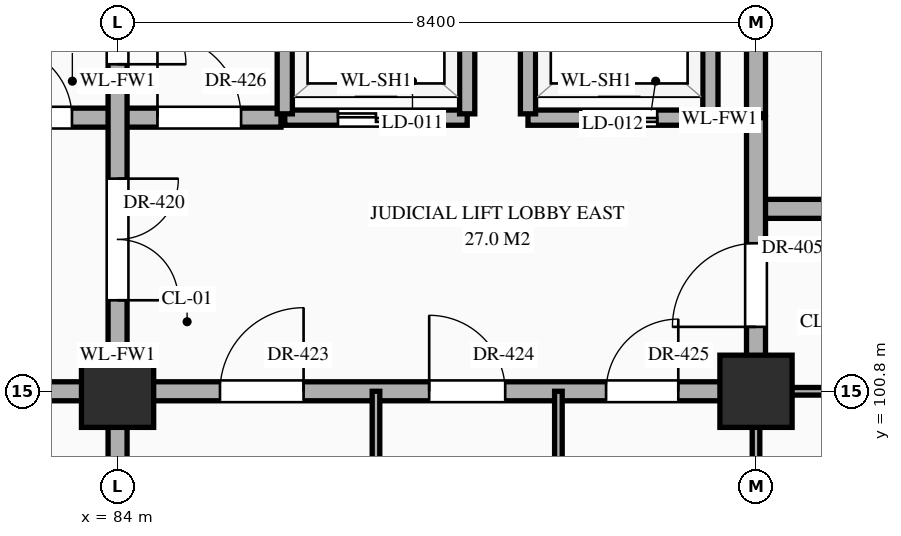
"""IFC4 building model, lengths in metres.
Left out: names, types, materials, properties, quantities, classifications, styles, units other than length and angle.
Written with IfcOpenShell. Run it as: python <this file> out.ifc"""

import sys

from ifc_helpers import new_model, si_unit, direction, frame, frame_2d, origin, origin_2d, place, context, subcontext, project, spatial, rectangle, extrude, element, fill, save


model = new_model("IFC4")
c1 = context("Model", 3, precision=1e-05, world=origin(), true_north=direction((0.0, 1.0)))
c2 = subcontext(c1, "Body", "Model", "MODEL_VIEW")
j1 = project(units=[si_unit("LENGTHUNIT", "METRE"), si_unit("PLANEANGLEUNIT", "RADIAN")], contexts=[c1])
p1 = place(None, origin())
s1 = spatial("IfcSite", under=j1, at=p1, CompositionType="ELEMENT")
p2 = place(p1, origin())
s2 = spatial("IfcBuilding", under=s1, at=p2, CompositionType="ELEMENT")
p3 = place(p2, frame((0.0, 0.0, -5.4)))
s3 = spatial("IfcBuildingStorey", under=s2, at=p3, CompositionType="ELEMENT", Elevation=-5.4)
for number, where, z_axis, x_axis in (
    (1, (84.0, 100.8, 0.0), (0.0, 0.0, 1.0), (1.0, 0.0, 0.0)),
    (2, (92.4, 100.8, 0.0), (0.0, 0.0, 1.0), (1.0, 0.0, 0.0)),
):
    element("IfcColumn", number, at=place(p3, frame(where, z_axis=z_axis, x_axis=x_axis)), inside=s3, PredefinedType="COLUMN", context=c2, shape_type="SweptSolid", body=[
        extrude(rectangle(XDim=0.95, YDim=0.95, at=origin_2d()), origin(), (0.0, 0.0, 1.0), 5.4),
    ])
p4 = place(p3, frame((75.6, 100.8, 0.0), z_axis=(0.0, 0.0, 1.0), x_axis=(1.0, 0.0, 0.0)))
e3 = element("IfcWall", 3, at=p4, inside=s3, PredefinedType="STANDARD", context=c2, shape_type="SweptSolid", body=[
    extrude(rectangle(XDim=16.8, YDim=0.25, at=frame_2d((8.4, 0.0))), origin(), (0.0, 0.0, 1.0), 4.25),
])
p5 = place(p4, frame((3.7, 0.0, 0.0)))
e4 = element("IfcOpeningElement", 4, at=p5, cuts=e3, PredefinedType="OPENING", context=c2, shape_type="SweptSolid", body=[
    extrude(rectangle(XDim=1.0, YDim=2.2, at=frame_2d((0.5, 1.1))), frame((0.0, 0.137, 0.0), z_axis=(0.0, -1.0, 0.0), x_axis=(1.0, 0.0, 0.0)), (0.0, 0.0, 1.0), 0.274),
])
p6 = place(p4, frame((9.748, 0.0, 0.0)))
e5 = element("IfcOpeningElement", 5, at=p6, cuts=e3, PredefinedType="OPENING", context=c2, shape_type="SweptSolid", body=[
    extrude(rectangle(XDim=1.1, YDim=2.2, at=frame_2d((0.55, 1.1))), frame((0.0, 0.137, 0.0), z_axis=(0.0, -1.0, 0.0), x_axis=(1.0, 0.0, 0.0)), (0.0, 0.0, 1.0), 0.274),
])
p7 = place(p4, frame((12.5, 0.0, 0.0)))
e6 = element("IfcOpeningElement", 6, at=p7, cuts=e3, PredefinedType="OPENING", context=c2, shape_type="SweptSolid", body=[
    extrude(rectangle(XDim=1.0, YDim=2.2, at=frame_2d((0.5, 1.1))), frame((0.0, 0.137, 0.0), z_axis=(0.0, -1.0, 0.0), x_axis=(1.0, 0.0, 0.0)), (0.0, 0.0, 1.0), 0.274),
])
p8 = place(p4, frame((14.827, 0.0, 0.0)))
e7 = element("IfcOpeningElement", 7, at=p8, cuts=e3, PredefinedType="OPENING", context=c2, shape_type="SweptSolid", body=[
    extrude(rectangle(XDim=0.95, YDim=2.15, at=frame_2d((0.475, 1.075))), frame((0.0, 0.137, 0.0), z_axis=(0.0, -1.0, 0.0), x_axis=(1.0, 0.0, 0.0)), (0.0, 0.0, 1.0), 0.274),
])
p9 = place(p3, frame((92.4, 100.8, 0.0), z_axis=(0.0, 0.0, 1.0), x_axis=(1.0, 0.0, 0.0)))
e8 = element("IfcWall", 8, at=p9, inside=s3, PredefinedType="STANDARD", context=c2, shape_type="SweptSolid", body=[
    extrude(rectangle(XDim=4.2, YDim=0.1, at=frame_2d((2.1, 0.0))), origin(), (0.0, 0.0, 1.0), 4.25),
])
p10 = place(p9, frame((1.768, 0.0, 0.0)))
e9 = element("IfcOpeningElement", 9, at=p10, cuts=e8, PredefinedType="OPENING", context=c2, shape_type="SweptSolid", body=[
    extrude(rectangle(XDim=1.06, YDim=2.4, at=frame_2d((0.53, 1.2))), frame((0.0, 0.062, 0.0), z_axis=(0.0, -1.0, 0.0), x_axis=(1.0, 0.0, 0.0)), (0.0, 0.0, 1.0), 0.124),
])
p11 = place(p3, frame((92.4, 103.2, 0.0), z_axis=(0.0, 0.0, 1.0), x_axis=(1.0, 0.0, 0.0)))
e10 = element("IfcWall", 10, at=p11, inside=s3, PredefinedType="STANDARD", context=c2, shape_type="SweptSolid", body=[
    extrude(rectangle(XDim=4.2, YDim=0.25, at=frame_2d((2.1, 0.0))), origin(), (0.0, 0.0, 1.0), 5.1),
])
p12 = place(p11, frame((1.6, 0.0, 0.0)))
e11 = element("IfcOpeningElement", 11, at=p12, cuts=e10, PredefinedType="OPENING", context=c2, shape_type="SweptSolid", body=[
    extrude(rectangle(XDim=1.0, YDim=2.2, at=frame_2d((0.5, 1.1))), frame((0.0, 0.137, 0.0), z_axis=(0.0, -1.0, 0.0), x_axis=(1.0, 0.0, 0.0)), (0.0, 0.0, 1.0), 0.274),
])
p13 = place(p3, frame((81.85, 104.4, 0.0), z_axis=(0.0, 0.0, 1.0), x_axis=(1.0, 0.0, 0.0)))
e12 = element("IfcWall", 12, at=p13, inside=s3, PredefinedType="STANDARD", context=c2, shape_type="SweptSolid", body=[
    extrude(rectangle(XDim=4.3, YDim=0.25, at=frame_2d((2.15, 0.0))), origin(), (0.0, 0.0, 1.0), 5.1),
])
p14 = place(p13, frame((0.6, 0.0, 0.0)))
e13 = element("IfcOpeningElement", 13, at=p14, cuts=e12, PredefinedType="OPENING", context=c2, shape_type="SweptSolid", body=[
    extrude(rectangle(XDim=0.95, YDim=2.15, at=frame_2d((0.475, 1.075))), frame((0.0, 0.137, 0.0), z_axis=(0.0, -1.0, 0.0), x_axis=(1.0, 0.0, 0.0)), (0.0, 0.0, 1.0), 0.274),
])
p15 = place(p13, frame((2.675, 0.0, 0.0)))
e14 = element("IfcOpeningElement", 14, at=p15, cuts=e12, PredefinedType="OPENING", context=c2, shape_type="SweptSolid", body=[
    extrude(rectangle(XDim=1.1, YDim=2.2, at=frame_2d((0.55, 1.1))), frame((0.0, 0.137, 0.0), z_axis=(0.0, -1.0, 0.0), x_axis=(1.0, 0.0, 0.0)), (0.0, 0.0, 1.0), 0.274),
])
p16 = place(p3, frame((86.2, 104.4, 0.0), z_axis=(0.0, 0.0, 1.0), x_axis=(1.0, 0.0, 0.0)))
e15 = element("IfcWall", 15, at=p16, inside=s3, PredefinedType="STANDARD", context=c2, shape_type="SweptSolid", body=[
    extrude(rectangle(XDim=2.4, YDim=0.2, at=frame_2d((1.2, 0.0))), origin(), (0.0, 0.0, 1.0), 5.1),
])
p17 = place(p16, frame((0.7, 0.0, 0.0)))
e16 = element("IfcOpeningElement", 16, at=p17, cuts=e15, PredefinedType="OPENING", context=c2, shape_type="SweptSolid", body=[
    extrude(rectangle(XDim=1.0, YDim=2.15, at=frame_2d((0.5, 1.075))), frame((0.0, 0.112, 0.0), z_axis=(0.0, -1.0, 0.0), x_axis=(1.0, 0.0, 0.0)), (0.0, 0.0, 1.0), 0.224),
])
p18 = place(p3, frame((89.4, 104.4, 0.0), z_axis=(0.0, 0.0, 1.0), x_axis=(1.0, 0.0, 0.0)))
e17 = element("IfcWall", 17, at=p18, inside=s3, PredefinedType="STANDARD", context=c2, shape_type="SweptSolid", body=[
    extrude(rectangle(XDim=2.4, YDim=0.2, at=frame_2d((1.2, 0.0))), origin(), (0.0, 0.0, 1.0), 5.1),
])
p19 = place(p18, frame((0.7, 0.0, 0.0)))
e18 = element("IfcOpeningElement", 18, at=p19, cuts=e17, PredefinedType="OPENING", context=c2, shape_type="SweptSolid", body=[
    extrude(rectangle(XDim=1.0, YDim=2.15, at=frame_2d((0.5, 1.075))), frame((0.0, 0.112, 0.0), z_axis=(0.0, -1.0, 0.0), x_axis=(1.0, 0.0, 0.0)), (0.0, 0.0, 1.0), 0.224),
])
p20 = place(p3, frame((84.0, 79.2, 0.0), z_axis=(0.0, 0.0, 1.0), x_axis=(0.0, 1.0, 0.0)))
e19 = element("IfcWall", 19, at=p20, inside=s3, PredefinedType="STANDARD", context=c2, shape_type="SweptSolid", body=[
    extrude(rectangle(XDim=35.96, YDim=0.25, at=frame_2d((17.98, 0.0))), origin(), (0.0, 0.0, 1.0), 4.35),
])
p21 = place(p20, frame((22.798, 0.0, 0.0)))
e20 = element("IfcOpeningElement", 20, at=p21, cuts=e19, PredefinedType="OPENING", context=c2, shape_type="SweptSolid", body=[
    extrude(rectangle(XDim=1.6, YDim=2.3, at=frame_2d((0.8, 1.15))), frame((0.0, 0.137, 0.0), z_axis=(0.0, -1.0, 0.0), x_axis=(1.0, 0.0, 0.0)), (0.0, 0.0, 1.0), 0.274),
])
p22 = place(p20, frame((12.528, 0.0, 0.0)))
e21 = element("IfcOpeningElement", 21, at=p22, cuts=e19, PredefinedType="OPENING", context=c2, shape_type="SweptSolid", body=[
    extrude(rectangle(XDim=0.95, YDim=2.15, at=frame_2d((0.475, 1.075))), frame((0.0, 0.137, 0.0), z_axis=(0.0, -1.0, 0.0), x_axis=(1.0, 0.0, 0.0)), (0.0, 0.0, 1.0), 0.274),
])
p23 = place(p20, frame((15.323, 0.0, 0.0)))
e22 = element("IfcOpeningElement", 22, at=p23, cuts=e19, PredefinedType="OPENING", context=c2, shape_type="SweptSolid", body=[
    extrude(rectangle(XDim=0.95, YDim=2.15, at=frame_2d((0.475, 1.075))), frame((0.0, 0.137, 0.0), z_axis=(0.0, -1.0, 0.0), x_axis=(1.0, 0.0, 0.0)), (0.0, 0.0, 1.0), 0.274),
])
p24 = place(p20, frame((25.903, 0.0, 0.0)))
e23 = element("IfcOpeningElement", 23, at=p24, cuts=e19, PredefinedType="OPENING", context=c2, shape_type="SweptSolid", body=[
    extrude(rectangle(XDim=1.8, YDim=2.35, at=frame_2d((0.9, 1.175))), frame((0.0, 0.137, 0.0), z_axis=(0.0, -1.0, 0.0), x_axis=(1.0, 0.0, 0.0)), (0.0, 0.0, 1.0), 0.274),
])
p25 = place(p20, frame((29.722, 0.0, 0.0)))
e24 = element("IfcOpeningElement", 24, at=p25, cuts=e19, PredefinedType="OPENING", context=c2, shape_type="SweptSolid", body=[
    extrude(rectangle(XDim=0.95, YDim=2.15, at=frame_2d((0.475, 1.075))), frame((0.0, 0.137, 0.0), z_axis=(0.0, -1.0, 0.0), x_axis=(1.0, 0.0, 0.0)), (0.0, 0.0, 1.0), 0.274),
])
p26 = place(p20, frame((5.327, 0.0, 0.0)))
e25 = element("IfcOpeningElement", 25, at=p26, cuts=e19, PredefinedType="OPENING", context=c2, shape_type="SweptSolid", body=[
    extrude(rectangle(XDim=0.95, YDim=2.15, at=frame_2d((0.475, 1.075))), frame((0.0, 0.137, 0.0), z_axis=(0.0, -1.0, 0.0), x_axis=(1.0, 0.0, 0.0)), (0.0, 0.0, 1.0), 0.274),
])
p27 = place(p3, frame((86.2, 104.45, 0.0), z_axis=(0.0, 0.0, 1.0), x_axis=(0.0, 1.0, 0.0)))
e26 = element("IfcWall", 26, at=p27, inside=s3, PredefinedType="STANDARD", context=c2, shape_type="SweptSolid", body=[
    extrude(rectangle(XDim=2.3, YDim=0.2, at=frame_2d((1.15, 0.0))), origin(), (0.0, 0.0, 1.0), 5.1),
])
p28 = place(p3, frame((87.4, 96.0, 0.0), z_axis=(0.0, 0.0, 1.0), x_axis=(0.0, 1.0, 0.0)))
e27 = element("IfcWall", 27, at=p28, inside=s3, PredefinedType="STANDARD", context=c2, shape_type="SweptSolid", body=[
    extrude(rectangle(XDim=4.8, YDim=0.1, at=frame_2d((2.4, 0.0))), origin(), (0.0, 0.0, 1.0), 5.1),
])
p29 = place(p28, frame((1.95, 0.0, 0.0)))
e28 = element("IfcOpeningElement", 28, at=p29, cuts=e27, PredefinedType="OPENING", context=c2, shape_type="SweptSolid", body=[
    extrude(rectangle(XDim=0.9, YDim=2.15, at=frame_2d((0.45, 1.075))), frame((0.0, 0.062, 0.0), z_axis=(0.0, -1.0, 0.0), x_axis=(1.0, 0.0, 0.0)), (0.0, 0.0, 1.0), 0.124),
])
for number, where, z_axis, x_axis in (
    (29, (88.6, 104.45, 0.0), (0.0, 0.0, 1.0), (0.0, 1.0, 0.0)),
    (30, (89.4, 104.45, 0.0), (0.0, 0.0, 1.0), (0.0, 1.0, 0.0)),
):
    element("IfcWall", number, at=place(p3, frame(where, z_axis=z_axis, x_axis=x_axis)), inside=s3, PredefinedType="STANDARD", context=c2, shape_type="SweptSolid", body=[
        extrude(rectangle(XDim=2.3, YDim=0.2, at=frame_2d((1.15, 0.0))), origin(), (0.0, 0.0, 1.0), 5.1),
    ])
p30 = place(p3, frame((89.8, 96.0, 0.0), z_axis=(0.0, 0.0, 1.0), x_axis=(0.0, 1.0, 0.0)))
e31 = element("IfcWall", 31, at=p30, inside=s3, PredefinedType="STANDARD", context=c2, shape_type="SweptSolid", body=[
    extrude(rectangle(XDim=4.8, YDim=0.1, at=frame_2d((2.4, 0.0))), origin(), (0.0, 0.0, 1.0), 5.1),
])
p31 = place(p30, frame((1.97, 0.0, 0.0)))
e32 = element("IfcOpeningElement", 32, at=p31, cuts=e31, PredefinedType="OPENING", context=c2, shape_type="SweptSolid", body=[
    extrude(rectangle(XDim=0.86, YDim=2.1, at=frame_2d((0.43, 1.05))), frame((0.0, 0.062, 0.0), z_axis=(0.0, -1.0, 0.0), x_axis=(1.0, 0.0, 0.0)), (0.0, 0.0, 1.0), 0.124),
])
p32 = place(p3, frame((91.8, 104.45, 0.0), z_axis=(0.0, 0.0, 1.0), x_axis=(0.0, 1.0, 0.0)))
e33 = element("IfcWall", 33, at=p32, inside=s3, PredefinedType="STANDARD", context=c2, shape_type="SweptSolid", body=[
    extrude(rectangle(XDim=2.3, YDim=0.2, at=frame_2d((1.15, 0.0))), origin(), (0.0, 0.0, 1.0), 5.1),
])
p33 = place(p3, frame((92.4, 96.0, 0.0), z_axis=(0.0, 0.0, 1.0), x_axis=(0.0, 1.0, 0.0)))
e34 = element("IfcWall", 34, at=p33, inside=s3, PredefinedType="STANDARD", context=c2, shape_type="SweptSolid", body=[
    extrude(rectangle(XDim=4.8, YDim=0.1, at=frame_2d((2.4, 0.0))), origin(), (0.0, 0.0, 1.0), 4.35),
])
p34 = place(p3, frame((92.4, 100.8, 0.0), z_axis=(0.0, 0.0, 1.0), x_axis=(0.0, 1.0, 0.0)))
e35 = element("IfcWall", 35, at=p34, inside=s3, PredefinedType="STANDARD", context=c2, shape_type="SweptSolid", body=[
    extrude(rectangle(XDim=3.6, YDim=0.25, at=frame_2d((1.8, 0.0))), origin(), (0.0, 0.0, 1.0), 4.35),
])
p35 = place(p34, frame((0.847, 0.0, 0.0)))
e36 = element("IfcOpeningElement", 36, at=p35, cuts=e35, PredefinedType="OPENING", context=c2, shape_type="SweptSolid", body=[
    extrude(rectangle(XDim=1.1, YDim=2.2, at=frame_2d((0.55, 1.1))), frame((0.0, 0.137, 0.0), z_axis=(0.0, -1.0, 0.0), x_axis=(1.0, 0.0, 0.0)), (0.0, 0.0, 1.0), 0.274),
])
p36 = place(p3, frame((92.4, 104.45, 0.0), z_axis=(0.0, 0.0, 1.0), x_axis=(0.0, 1.0, 0.0)))
e37 = element("IfcWall", 37, at=p36, inside=s3, PredefinedType="STANDARD", context=c2, shape_type="SweptSolid", body=[
    extrude(rectangle(XDim=3.5, YDim=0.25, at=frame_2d((1.75, 0.0))), origin(), (0.0, 0.0, 1.0), 4.35),
])
p37 = place(p17, origin())
e38 = element("IfcDoor", 38, at=p37, inside=s3, OperationType="DOUBLE_DOOR_SLIDING", PredefinedType="DOOR", context=c2, shape_type="SweptSolid", body=[
    extrude(rectangle(XDim=1.0, YDim=2.15, at=frame_2d((0.5, 1.075))), frame((0.0, 0.025, 0.0), z_axis=(0.0, -1.0, 0.0), x_axis=(1.0, 0.0, 0.0)), (0.0, 0.0, 1.0), 0.05),
])
fill(e16, e38)
p38 = place(p19, origin())
e39 = element("IfcDoor", 39, at=p38, inside=s3, OperationType="DOUBLE_DOOR_SLIDING", PredefinedType="DOOR", context=c2, shape_type="SweptSolid", body=[
    extrude(rectangle(XDim=1.0, YDim=2.15, at=frame_2d((0.5, 1.075))), frame((0.0, 0.025, 0.0), z_axis=(0.0, -1.0, 0.0), x_axis=(1.0, 0.0, 0.0)), (0.0, 0.0, 1.0), 0.05),
])
fill(e18, e39)
p39 = place(p35, origin())
e40 = element("IfcDoor", 40, at=p39, inside=s3, OperationType="SINGLE_SWING_LEFT", PredefinedType="DOOR", context=c2, shape_type="SweptSolid", body=[
    extrude(rectangle(XDim=1.1, YDim=2.2, at=frame_2d((0.55, 1.1))), frame((0.0, 0.025, 0.0), z_axis=(0.0, -1.0, 0.0), x_axis=(1.0, 0.0, 0.0)), (0.0, 0.0, 1.0), 0.05),
])
fill(e36, e40)
p40 = place(p21, frame((1.6, 0.0, 0.0), z_axis=(0.0, 0.0, 1.0), x_axis=(-1.0, 0.0, 0.0)))
e41 = element("IfcDoor", 41, at=p40, inside=s3, OperationType="DOUBLE_DOOR_SINGLE_SWING", PredefinedType="DOOR", context=c2, shape_type="SweptSolid", body=[
    extrude(rectangle(XDim=1.6, YDim=2.3, at=frame_2d((0.8, 1.15))), frame((0.0, 0.025, 0.0), z_axis=(0.0, -1.0, 0.0), x_axis=(1.0, 0.0, 0.0)), (0.0, 0.0, 1.0), 0.05),
])
fill(e20, e41)
p41 = place(p14, origin())
e42 = element("IfcDoor", 42, at=p41, inside=s3, OperationType="SINGLE_SWING_LEFT", PredefinedType="DOOR", context=c2, shape_type="SweptSolid", body=[
    extrude(rectangle(XDim=0.95, YDim=2.15, at=frame_2d((0.475, 1.075))), frame((0.0, 0.025, 0.0), z_axis=(0.0, -1.0, 0.0), x_axis=(1.0, 0.0, 0.0)), (0.0, 0.0, 1.0), 0.05),
])
fill(e13, e42)
p42 = place(p6, origin())
e43 = element("IfcDoor", 43, at=p42, inside=s3, OperationType="SINGLE_SWING_RIGHT", PredefinedType="DOOR", context=c2, shape_type="SweptSolid", body=[
    extrude(rectangle(XDim=1.1, YDim=2.2, at=frame_2d((0.55, 1.1))), frame((0.0, 0.025, 0.0), z_axis=(0.0, -1.0, 0.0), x_axis=(1.0, 0.0, 0.0)), (0.0, 0.0, 1.0), 0.05),
])
fill(e5, e43)
p43 = place(p7, origin())
e44 = element("IfcDoor", 44, at=p43, inside=s3, OperationType="SINGLE_SWING_LEFT", PredefinedType="DOOR", context=c2, shape_type="SweptSolid", body=[
    extrude(rectangle(XDim=1.0, YDim=2.2, at=frame_2d((0.5, 1.1))), frame((0.0, 0.025, 0.0), z_axis=(0.0, -1.0, 0.0), x_axis=(1.0, 0.0, 0.0)), (0.0, 0.0, 1.0), 0.05),
])
fill(e6, e44)
p44 = place(p8, origin())
e45 = element("IfcDoor", 45, at=p44, inside=s3, OperationType="SINGLE_SWING_RIGHT", PredefinedType="DOOR", context=c2, shape_type="SweptSolid", body=[
    extrude(rectangle(XDim=0.95, YDim=2.15, at=frame_2d((0.475, 1.075))), frame((0.0, 0.025, 0.0), z_axis=(0.0, -1.0, 0.0), x_axis=(1.0, 0.0, 0.0)), (0.0, 0.0, 1.0), 0.05),
])
fill(e7, e45)
p45 = place(p15, origin())
e46 = element("IfcDoor", 46, at=p45, inside=s3, OperationType="SINGLE_SWING_LEFT", PredefinedType="DOOR", context=c2, shape_type="SweptSolid", body=[
    extrude(rectangle(XDim=1.1, YDim=2.2, at=frame_2d((0.55, 1.1))), frame((0.0, 0.025, 0.0), z_axis=(0.0, -1.0, 0.0), x_axis=(1.0, 0.0, 0.0)), (0.0, 0.0, 1.0), 0.05),
])
fill(e14, e46)
p46 = place(p24, frame((1.8, 0.0, 0.0), z_axis=(0.0, 0.0, 1.0), x_axis=(-1.0, 0.0, 0.0)))
e47 = element("IfcDoor", 47, at=p46, inside=s3, OperationType="DOUBLE_DOOR_SINGLE_SWING", PredefinedType="DOOR", context=c2, shape_type="SweptSolid", body=[
    extrude(rectangle(XDim=1.8, YDim=2.35, at=frame_2d((0.9, 1.175))), frame((0.0, 0.025, 0.0), z_axis=(0.0, -1.0, 0.0), x_axis=(1.0, 0.0, 0.0)), (0.0, 0.0, 1.0), 0.05),
])
fill(e23, e47)
save(model, sys.argv[1])
